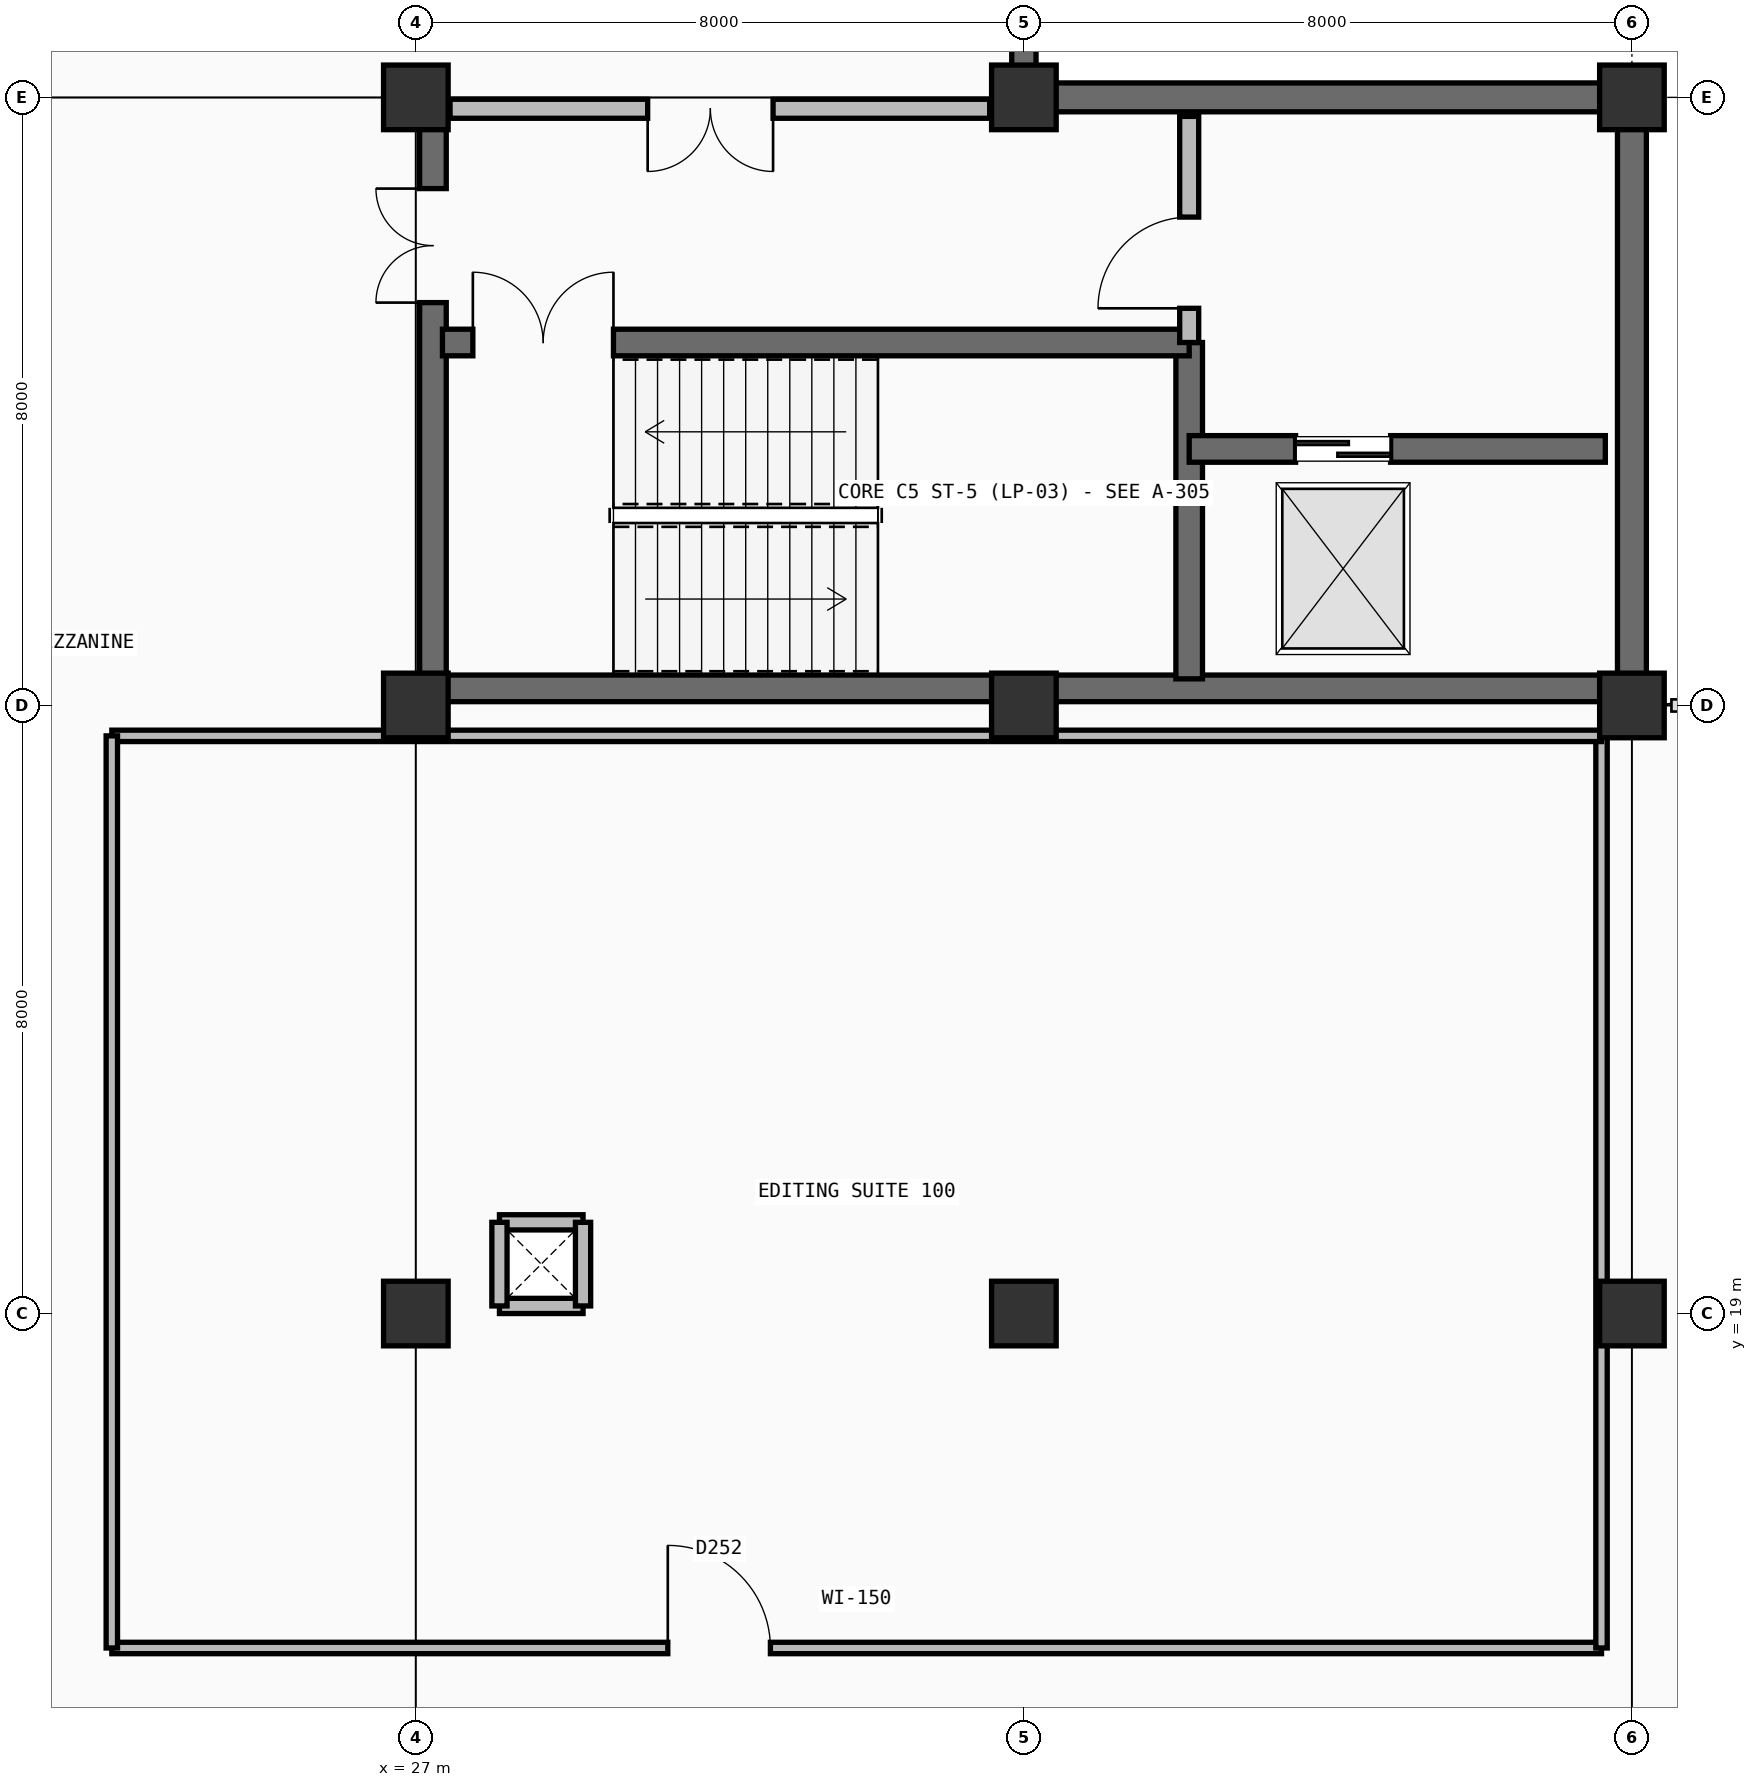
"""IFC4 building model, lengths in metres.
Left out: names, types, materials, properties, quantities, classifications, styles, units other than length and angle.
Written with IfcOpenShell. Run it as: python <this file> out.ifc"""

import sys

from ifc_helpers import new_model, si_unit, direction, frame, frame_2d, origin, origin_2d, place, context, subcontext, project, spatial, rectangle, extrude, element, fill, save


model = new_model("IFC4")
c1 = context("Model", 3, precision=1e-05, world=origin(), true_north=direction((0.0, 1.0)))
c2 = subcontext(c1, "Body", "Model", "MODEL_VIEW")
j1 = project(units=[si_unit("LENGTHUNIT", "METRE"), si_unit("PLANEANGLEUNIT", "RADIAN")], contexts=[c1])
p1 = place(None, origin())
s1 = spatial("IfcSite", under=j1, at=p1, CompositionType="ELEMENT")
p2 = place(p1, origin())
s2 = spatial("IfcBuilding", under=s1, at=p2, CompositionType="ELEMENT")
p3 = place(p2, frame((0.0, 0.0, 5.4)))
s3 = spatial("IfcBuildingStorey", under=s2, at=p3, CompositionType="ELEMENT", Elevation=5.4)
for number, where, z_axis, x_axis in (
    (1, (27.0, 19.0, 0.0), (0.0, 0.0, 1.0), (1.0, 0.0, 0.0)),
    (2, (27.0, 27.0, 0.0), (0.0, 0.0, 1.0), (1.0, 0.0, 0.0)),
    (3, (27.0, 35.0, 0.0), (0.0, 0.0, 1.0), (1.0, 0.0, 0.0)),
    (4, (35.0, 19.0, 0.0), (0.0, 0.0, 1.0), (1.0, 0.0, 0.0)),
    (5, (35.0, 27.0, 0.0), (0.0, 0.0, 1.0), (1.0, 0.0, 0.0)),
    (6, (35.0, 35.0, 0.0), (0.0, 0.0, 1.0), (1.0, 0.0, 0.0)),
    (7, (43.0, 19.0, 0.0), (0.0, 0.0, 1.0), (1.0, 0.0, 0.0)),
    (8, (43.0, 27.0, 0.0), (0.0, 0.0, 1.0), (1.0, 0.0, 0.0)),
    (9, (43.0, 35.0, 0.0), (0.0, 0.0, 1.0), (1.0, 0.0, 0.0)),
):
    element("IfcColumn", number, at=place(p3, frame(where, z_axis=z_axis, x_axis=x_axis)), inside=s3, PredefinedType="COLUMN", context=c2, shape_type="SweptSolid", body=[
        extrude(rectangle(XDim=0.85, YDim=0.85, at=origin_2d()), origin(), (0.0, 0.0, 1.0), 4.5),
    ])
p4 = place(p3, frame((35.0, 43.0, 0.0), z_axis=(0.0, 0.0, 1.0), x_axis=(0.0, -1.0, 0.0)))
e10 = element("IfcWall", 10, at=p4, inside=s3, PredefinedType="SOLIDWALL", context=c2, shape_type="SweptSolid", body=[
    extrude(rectangle(XDim=8.0, YDim=0.32, at=frame_2d((4.0, 0.0))), origin(), (0.0, 0.0, 1.0), 4.5),
])
p5 = place(p4, frame((2.7, 0.0, 1.1)))
e11 = element("IfcOpeningElement", 11, at=p5, cuts=e10, PredefinedType="OPENING", context=c2, shape_type="SweptSolid", body=[
    extrude(rectangle(XDim=2.6, YDim=1.2, at=frame_2d((1.3, 0.6))), frame((0.0, 0.17, 0.0), z_axis=(0.0, -1.0, 0.0), x_axis=(1.0, 0.0, 0.0)), (0.0, 0.0, 1.0), 0.34),
])
for number, where, z_axis, x_axis in (
    (12, (35.0, 35.0, 0.0), (0.0, 0.0, 1.0), (1.0, 0.0, 0.0)),
    (13, (43.0, 35.0, 0.0), (0.0, 0.0, 1.0), (0.0, -1.0, 0.0)),
):
    element("IfcWall", number, at=place(p3, frame(where, z_axis=z_axis, x_axis=x_axis)), inside=s3, PredefinedType="SOLIDWALL", context=c2, shape_type="SweptSolid", body=[
        extrude(rectangle(XDim=8.0, YDim=0.38, at=frame_2d((4.0, 0.0))), origin(), (0.0, 0.0, 1.0), 4.5),
    ])
p6 = place(p3, frame((27.2, 27.225, 0.0), z_axis=(0.0, 0.0, 1.0), x_axis=(1.0, 0.0, 0.0)))
e14 = element("IfcWall", 14, at=p6, inside=s3, PredefinedType="SHEAR", context=c2, shape_type="SweptSolid", body=[
    extrude(rectangle(XDim=15.6, YDim=0.35, at=frame_2d((7.8, 0.0))), origin(), (0.0, 0.0, 1.0), 4.2),
])
p7 = place(p3, frame((27.225, 27.2, 0.0), z_axis=(0.0, 0.0, 1.0), x_axis=(0.0, 1.0, 0.0)))
e15 = element("IfcWall", 15, at=p7, inside=s3, PredefinedType="SHEAR", context=c2, shape_type="SweptSolid", body=[
    extrude(rectangle(XDim=7.6, YDim=0.35, at=frame_2d((3.8, 0.0))), origin(), (0.0, 0.0, 1.0), 4.2),
])
p8 = place(p7, frame((5.1, 0.0, 0.0)))
e16 = element("IfcOpeningElement", 16, at=p8, cuts=e15, PredefinedType="OPENING", context=c2, shape_type="SweptSolid", body=[
    extrude(rectangle(XDim=1.5, YDim=2.2, at=frame_2d((0.75, 1.1))), frame((0.0, 0.185, 0.0), z_axis=(0.0, -1.0, 0.0), x_axis=(1.0, 0.0, 0.0)), (0.0, 0.0, 1.0), 0.37),
])
p9 = place(p3, frame((37.175, 27.35, 0.0), z_axis=(0.0, 0.0, 1.0), x_axis=(0.0, 1.0, 0.0)))
e17 = element("IfcWall", 17, at=p9, inside=s3, PredefinedType="SHEAR", context=c2, shape_type="SweptSolid", body=[
    extrude(rectangle(XDim=4.425, YDim=0.35, at=frame_2d((2.212, 0.0))), origin(), (0.0, 0.0, 1.0), 4.2),
])
p10 = place(p3, frame((27.35, 31.775, 0.0), z_axis=(0.0, 0.0, 1.0), x_axis=(1.0, 0.0, 0.0)))
e18 = element("IfcWall", 18, at=p10, inside=s3, PredefinedType="SHEAR", context=c2, shape_type="SweptSolid", body=[
    extrude(rectangle(XDim=9.825, YDim=0.35, at=frame_2d((4.913, 0.0))), origin(), (0.0, 0.0, 1.0), 4.2),
])
p11 = place(p10, frame((0.4, 0.0, 0.0)))
e19 = element("IfcOpeningElement", 19, at=p11, cuts=e18, PredefinedType="OPENING", context=c2, shape_type="SweptSolid", body=[
    extrude(rectangle(XDim=1.85, YDim=2.25, at=frame_2d((0.925, 1.125))), frame((0.0, 0.185, 0.0), z_axis=(0.0, -1.0, 0.0), x_axis=(1.0, 0.0, 0.0)), (0.0, 0.0, 1.0), 0.37),
])
p12 = place(p3, frame((37.175, 30.375, 0.0), z_axis=(0.0, 0.0, 1.0), x_axis=(1.0, 0.0, 0.0)))
e20 = element("IfcWall", 20, at=p12, inside=s3, PredefinedType="SHEAR", context=c2, shape_type="SweptSolid", body=[
    extrude(rectangle(XDim=5.475, YDim=0.35, at=frame_2d((2.737, 0.0))), origin(), (0.0, 0.0, 1.0), 4.2),
])
p13 = place(p12, frame((1.4, 0.0, 0.0)))
e21 = element("IfcOpeningElement", 21, at=p13, cuts=e20, PredefinedType="OPENING", context=c2, shape_type="SweptSolid", body=[
    extrude(rectangle(XDim=1.25, YDim=2.25, at=frame_2d((0.625, 1.125))), frame((0.0, 0.185, 0.0), z_axis=(0.0, -1.0, 0.0), x_axis=(1.0, 0.0, 0.0)), (0.0, 0.0, 1.0), 0.37),
])
p14 = place(p3, frame((37.175, 31.775, 0.0), z_axis=(0.0, 0.0, 1.0), x_axis=(0.0, 1.0, 0.0)))
e22 = element("IfcWall", 22, at=p14, inside=s3, PredefinedType="PARTITIONING", context=c2, shape_type="SweptSolid", body=[
    extrude(rectangle(XDim=2.975, YDim=0.25, at=frame_2d((1.488, 0.0))), origin(), (0.0, 0.0, 1.0), 4.2),
])
p15 = place(p14, frame((0.45, 0.0, 0.0)))
e23 = element("IfcOpeningElement", 23, at=p15, cuts=e22, PredefinedType="OPENING", context=c2, shape_type="SweptSolid", body=[
    extrude(rectangle(XDim=1.2, YDim=2.2, at=frame_2d((0.6, 1.1))), frame((0.0, 0.135, 0.0), z_axis=(0.0, -1.0, 0.0), x_axis=(1.0, 0.0, 0.0)), (0.0, 0.0, 1.0), 0.27),
])
p16 = place(p3, frame((27.45, 34.85, 0.0), z_axis=(0.0, 0.0, 1.0), x_axis=(1.0, 0.0, 0.0)))
e24 = element("IfcWall", 24, at=p16, inside=s3, PredefinedType="PARTITIONING", context=c2, shape_type="SweptSolid", body=[
    extrude(rectangle(XDim=7.1, YDim=0.25, at=frame_2d((3.55, 0.0))), origin(), (0.0, 0.0, 1.0), 3.435),
])
p17 = place(p16, frame((2.6, 0.0, 0.0)))
e25 = element("IfcOpeningElement", 25, at=p17, cuts=e24, PredefinedType="OPENING", context=c2, shape_type="SweptSolid", body=[
    extrude(rectangle(XDim=1.65, YDim=2.25, at=frame_2d((0.825, 1.125))), frame((0.0, 0.135, 0.0), z_axis=(0.0, -1.0, 0.0), x_axis=(1.0, 0.0, 0.0)), (0.0, 0.0, 1.0), 0.27),
])
p18 = place(p3, frame((23.0, 14.6, 0.0), z_axis=(0.0, 0.0, 1.0), x_axis=(1.0, 0.0, 0.0)))
e26 = element("IfcWall", 26, at=p18, inside=s3, PredefinedType="PARTITIONING", context=c2, shape_type="SweptSolid", body=[
    extrude(rectangle(XDim=19.6, YDim=0.15, at=frame_2d((9.8, 0.0))), origin(), (0.0, 0.0, 1.0), 4.2),
])
p19 = place(p18, frame((7.315, 0.0, 0.0)))
e27 = element("IfcOpeningElement", 27, at=p19, cuts=e26, PredefinedType="OPENING", context=c2, shape_type="SweptSolid", body=[
    extrude(rectangle(XDim=1.35, YDim=2.2, at=frame_2d((0.675, 1.1))), frame((0.0, 0.085, 0.0), z_axis=(0.0, -1.0, 0.0), x_axis=(1.0, 0.0, 0.0)), (0.0, 0.0, 1.0), 0.17),
])
p20 = place(p3, frame((42.6, 14.6, 0.0), z_axis=(0.0, 0.0, 1.0), x_axis=(0.0, 1.0, 0.0)))
e28 = element("IfcWall", 28, at=p20, inside=s3, PredefinedType="PARTITIONING", context=c2, shape_type="SweptSolid", body=[
    extrude(rectangle(XDim=12.0, YDim=0.15, at=frame_2d((6.0, 0.0))), origin(), (0.0, 0.0, 1.0), 3.485),
])
p21 = place(p3, frame((23.0, 26.6, 0.0), z_axis=(0.0, 0.0, 1.0), x_axis=(1.0, 0.0, 0.0)))
e29 = element("IfcWall", 29, at=p21, inside=s3, PredefinedType="PARTITIONING", context=c2, shape_type="SweptSolid", body=[
    extrude(rectangle(XDim=19.6, YDim=0.15, at=frame_2d((9.8, 0.0))), origin(), (0.0, 0.0, 1.0), 3.435),
])
p22 = place(p3, frame((23.0, 14.6, 0.0), z_axis=(0.0, 0.0, 1.0), x_axis=(0.0, 1.0, 0.0)))
e30 = element("IfcWall", 30, at=p22, inside=s3, PredefinedType="PARTITIONING", context=c2, shape_type="SweptSolid", body=[
    extrude(rectangle(XDim=12.0, YDim=0.15, at=frame_2d((6.0, 0.0))), origin(), (0.0, 0.0, 1.0), 3.635),
])
p23 = place(p3, frame((28.1, 19.1, 0.0), z_axis=(0.0, 0.0, 1.0), x_axis=(1.0, 0.0, 0.0)))
e31 = element("IfcWall", 31, at=p23, inside=s3, PredefinedType="PARTITIONING", context=c2, shape_type="SweptSolid", body=[
    extrude(rectangle(XDim=1.1, YDim=0.2, at=frame_2d((0.55, 0.0))), origin(), (0.0, 0.0, 1.0), 3.435),
])
for number, where, z_axis, x_axis in (
    (32, (28.1, 20.2, 0.0), (0.0, 0.0, 1.0), (1.0, 0.0, 0.0)),
    (33, (28.1, 19.1, 0.0), (0.0, 0.0, 1.0), (0.0, 1.0, 0.0)),
    (34, (29.2, 19.1, 0.0), (0.0, 0.0, 1.0), (0.0, 1.0, 0.0)),
):
    element("IfcWall", number, at=place(p3, frame(where, z_axis=z_axis, x_axis=x_axis)), inside=s3, PredefinedType="PARTITIONING", context=c2, shape_type="SweptSolid", body=[
        extrude(rectangle(XDim=1.1, YDim=0.2, at=frame_2d((0.55, 0.0))), origin(), (0.0, 0.0, 1.0), 4.2),
    ])
p24 = place(p11, origin())
e35 = element("IfcDoor", 35, at=p24, inside=s3, OperationType="DOUBLE_DOOR_SINGLE_SWING", PredefinedType="DOOR", context=c2, shape_type="SweptSolid", body=[
    extrude(rectangle(XDim=1.85, YDim=2.25, at=frame_2d((0.925, 1.125))), frame((0.0, 0.025, 0.0), z_axis=(0.0, -1.0, 0.0), x_axis=(1.0, 0.0, 0.0)), (0.0, 0.0, 1.0), 0.05),
])
fill(e19, e35)
p25 = place(p13, origin())
e36 = element("IfcDoor", 36, at=p25, inside=s3, OperationType="DOUBLE_DOOR_SLIDING", PredefinedType="DOOR", context=c2, shape_type="SweptSolid", body=[
    extrude(rectangle(XDim=1.25, YDim=2.25, at=frame_2d((0.625, 1.125))), frame((0.0, 0.025, 0.0), z_axis=(0.0, -1.0, 0.0), x_axis=(1.0, 0.0, 0.0)), (0.0, 0.0, 1.0), 0.05),
])
fill(e21, e36)
p26 = place(p15, origin())
e37 = element("IfcDoor", 37, at=p26, inside=s3, OperationType="SINGLE_SWING_LEFT", PredefinedType="DOOR", context=c2, shape_type="SweptSolid", body=[
    extrude(rectangle(XDim=1.2, YDim=2.2, at=frame_2d((0.6, 1.1))), frame((0.0, 0.025, 0.0), z_axis=(0.0, -1.0, 0.0), x_axis=(1.0, 0.0, 0.0)), (0.0, 0.0, 1.0), 0.05),
])
fill(e23, e37)
p27 = place(p17, frame((1.65, 0.0, 0.0), z_axis=(0.0, 0.0, 1.0), x_axis=(-1.0, 0.0, 0.0)))
e38 = element("IfcDoor", 38, at=p27, inside=s3, OperationType="DOUBLE_DOOR_SINGLE_SWING", PredefinedType="DOOR", context=c2, shape_type="SweptSolid", body=[
    extrude(rectangle(XDim=1.65, YDim=2.25, at=frame_2d((0.825, 1.125))), frame((0.0, 0.025, 0.0), z_axis=(0.0, -1.0, 0.0), x_axis=(1.0, 0.0, 0.0)), (0.0, 0.0, 1.0), 0.05),
])
fill(e25, e38)
p28 = place(p8, origin())
e39 = element("IfcDoor", 39, at=p28, inside=s3, OperationType="DOUBLE_DOOR_SINGLE_SWING", PredefinedType="DOOR", context=c2, shape_type="SweptSolid", body=[
    extrude(rectangle(XDim=1.5, YDim=2.2, at=frame_2d((0.75, 1.1))), frame((0.0, 0.025, 0.0), z_axis=(0.0, -1.0, 0.0), x_axis=(1.0, 0.0, 0.0)), (0.0, 0.0, 1.0), 0.05),
])
fill(e16, e39)
p29 = place(p19, origin())
e40 = element("IfcDoor", 40, at=p29, inside=s3, OperationType="SINGLE_SWING_LEFT", PredefinedType="DOOR", context=c2, shape_type="SweptSolid", body=[
    extrude(rectangle(XDim=1.35, YDim=2.2, at=frame_2d((0.675, 1.1))), frame((0.0, 0.025, 0.0), z_axis=(0.0, -1.0, 0.0), x_axis=(1.0, 0.0, 0.0)), (0.0, 0.0, 1.0), 0.05),
])
fill(e27, e40)
save(model, sys.argv[1])
